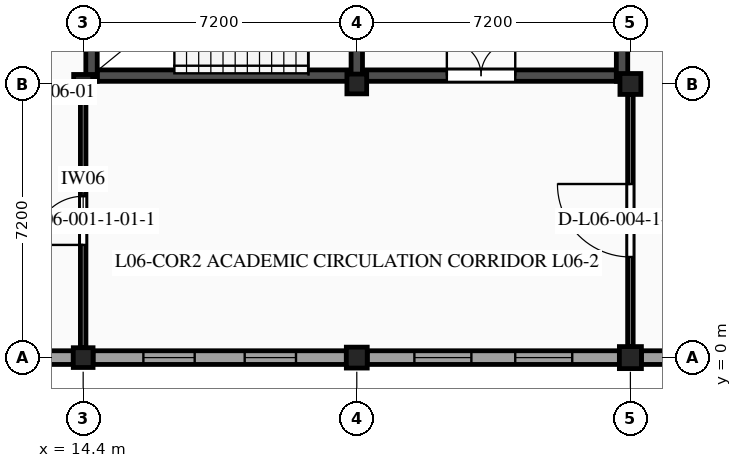
"""IFC4 building model, lengths in metres.
Left out: names, types, materials, properties, quantities, classifications, styles, units other than length and angle.
Written with IfcOpenShell. Run it as: python <this file> out.ifc"""

import sys

from ifc_helpers import new_model, si_unit, direction, frame, frame_2d, origin, origin_2d, place, context, subcontext, project, spatial, rectangle, extrude, element, fill, save


model = new_model("IFC4")
c1 = context("Model", 3, precision=1e-05, world=origin(), true_north=direction((0.0, 1.0)))
c2 = subcontext(c1, "Body", "Model", "MODEL_VIEW")
j1 = project(units=[si_unit("LENGTHUNIT", "METRE"), si_unit("PLANEANGLEUNIT", "RADIAN")], contexts=[c1])
p1 = place(None, origin())
s1 = spatial("IfcSite", under=j1, at=p1, CompositionType="ELEMENT")
p2 = place(p1, origin())
s2 = spatial("IfcBuilding", under=s1, at=p2, CompositionType="ELEMENT")
p3 = place(p2, frame((0.0, 0.0, 26.7)))
s3 = spatial("IfcBuildingStorey", under=s2, at=p3, CompositionType="ELEMENT", Elevation=26.7)
p4 = place(p3, frame((14.4, 0.0, 0.0), z_axis=(0.0, 0.0, 1.0), x_axis=(1.0, 0.0, 0.0)))
e1 = element("IfcColumn", 1, at=p4, inside=s3, PredefinedType="COLUMN", context=c2, shape_type="SweptSolid", body=[
    extrude(rectangle(XDim=0.52, YDim=0.52, at=origin_2d()), origin(), (0.0, 0.0, 1.0), 3.9),
])
p5 = place(p3, frame((14.4, 7.2, 0.0), z_axis=(0.0, 0.0, 1.0), x_axis=(1.0, 0.0, 0.0)))
e2 = element("IfcColumn", 2, at=p5, inside=s3, PredefinedType="COLUMN", context=c2, shape_type="SweptSolid", body=[
    extrude(rectangle(XDim=0.5, YDim=0.5, at=origin_2d()), origin(), (0.0, 0.0, 1.0), 3.9),
])
p6 = place(p3, frame((21.6, 0.0, 0.0), z_axis=(0.0, 0.0, 1.0), x_axis=(1.0, 0.0, 0.0)))
e3 = element("IfcColumn", 3, at=p6, inside=s3, PredefinedType="COLUMN", context=c2, shape_type="SweptSolid", body=[
    extrude(rectangle(XDim=0.55, YDim=0.55, at=origin_2d()), origin(), (0.0, 0.0, 1.0), 3.9),
])
p7 = place(p3, frame((21.6, 7.2, 0.0), z_axis=(0.0, 0.0, 1.0), x_axis=(1.0, 0.0, 0.0)))
e4 = element("IfcColumn", 4, at=p7, inside=s3, PredefinedType="COLUMN", context=c2, shape_type="SweptSolid", body=[
    extrude(rectangle(XDim=0.52, YDim=0.52, at=origin_2d()), origin(), (0.0, 0.0, 1.0), 3.9),
])
p8 = place(p3, frame((28.8, 0.0, 0.0), z_axis=(0.0, 0.0, 1.0), x_axis=(1.0, 0.0, 0.0)))
e5 = element("IfcColumn", 5, at=p8, inside=s3, PredefinedType="COLUMN", context=c2, shape_type="SweptSolid", body=[
    extrude(rectangle(XDim=0.58, YDim=0.58, at=origin_2d()), origin(), (0.0, 0.0, 1.0), 3.9),
])
p9 = place(p3, frame((28.8, 7.2, 0.0), z_axis=(0.0, 0.0, 1.0), x_axis=(1.0, 0.0, 0.0)))
e6 = element("IfcColumn", 6, at=p9, inside=s3, PredefinedType="COLUMN", context=c2, shape_type="SweptSolid", body=[
    extrude(rectangle(XDim=0.55, YDim=0.55, at=origin_2d()), origin(), (0.0, 0.0, 1.0), 3.9),
])
p10 = place(p3, frame((35.75, 0.0, 0.0), z_axis=(0.0, 0.0, 1.0), x_axis=(-1.0, 0.0, 0.0)))
e7 = element("IfcWall", 7, at=p10, inside=s3, PredefinedType="STANDARD", context=c2, shape_type="SweptSolid", body=[
    extrude(rectangle(XDim=6.66, YDim=0.36, at=frame_2d((3.33, 0.0))), origin(), (0.0, 0.0, 1.0), 2.83),
])
p11 = place(p10, frame((1.548, 0.0, 1.15)))
e8 = element("IfcOpeningElement", 8, at=p11, cuts=e7, PredefinedType="OPENING", context=c2, shape_type="SweptSolid", body=[
    extrude(rectangle(XDim=0.9, YDim=1.3, at=frame_2d((0.45, 0.65))), frame((0.0, 0.19, 0.0), z_axis=(0.0, -1.0, 0.0), x_axis=(1.0, 0.0, 0.0)), (0.0, 0.0, 1.0), 0.38),
])
p12 = place(p10, frame((4.212, 0.0, 1.15)))
e9 = element("IfcOpeningElement", 9, at=p12, cuts=e7, PredefinedType="OPENING", context=c2, shape_type="SweptSolid", body=[
    extrude(rectangle(XDim=0.9, YDim=1.3, at=frame_2d((0.45, 0.65))), frame((0.0, 0.19, 0.0), z_axis=(0.0, -1.0, 0.0), x_axis=(1.0, 0.0, 0.0)), (0.0, 0.0, 1.0), 0.38),
])
p13 = place(p3, frame((28.51, 0.0, 0.0), z_axis=(0.0, 0.0, 1.0), x_axis=(-1.0, 0.0, 0.0)))
e10 = element("IfcWall", 10, at=p13, inside=s3, PredefinedType="STANDARD", context=c2, shape_type="SweptSolid", body=[
    extrude(rectangle(XDim=6.635, YDim=0.36, at=frame_2d((3.317, 0.0))), origin(), (0.0, 0.0, 1.0), 2.865),
])
p14 = place(p13, frame((1.24, 0.0, 1.15)))
e11 = element("IfcOpeningElement", 11, at=p14, cuts=e10, PredefinedType="OPENING", context=c2, shape_type="SweptSolid", body=[
    extrude(rectangle(XDim=1.5, YDim=1.2, at=frame_2d((0.75, 0.6))), frame((0.0, 0.19, 0.0), z_axis=(0.0, -1.0, 0.0), x_axis=(1.0, 0.0, 0.0)), (0.0, 0.0, 1.0), 0.38),
])
p15 = place(p13, frame((3.895, 0.0, 1.15)))
e12 = element("IfcOpeningElement", 12, at=p15, cuts=e10, PredefinedType="OPENING", context=c2, shape_type="SweptSolid", body=[
    extrude(rectangle(XDim=1.5, YDim=1.2, at=frame_2d((0.75, 0.6))), frame((0.0, 0.19, 0.0), z_axis=(0.0, -1.0, 0.0), x_axis=(1.0, 0.0, 0.0)), (0.0, 0.0, 1.0), 0.38),
])
p16 = place(p3, frame((21.325, 0.0, 0.0), z_axis=(0.0, 0.0, 1.0), x_axis=(-1.0, 0.0, 0.0)))
e13 = element("IfcWall", 13, at=p16, inside=s3, PredefinedType="STANDARD", context=c2, shape_type="SweptSolid", body=[
    extrude(rectangle(XDim=6.665, YDim=0.36, at=frame_2d((3.333, 0.0))), origin(), (0.0, 0.0, 1.0), 2.865),
])
p17 = place(p16, frame((1.324, 0.0, 1.15)))
e14 = element("IfcOpeningElement", 14, at=p17, cuts=e13, PredefinedType="OPENING", context=c2, shape_type="SweptSolid", body=[
    extrude(rectangle(XDim=1.35, YDim=1.1, at=frame_2d((0.675, 0.55))), frame((0.0, 0.19, 0.0), z_axis=(0.0, -1.0, 0.0), x_axis=(1.0, 0.0, 0.0)), (0.0, 0.0, 1.0), 0.38),
])
p18 = place(p16, frame((3.99, 0.0, 1.15)))
e15 = element("IfcOpeningElement", 15, at=p18, cuts=e13, PredefinedType="OPENING", context=c2, shape_type="SweptSolid", body=[
    extrude(rectangle(XDim=1.35, YDim=1.1, at=frame_2d((0.675, 0.55))), frame((0.0, 0.19, 0.0), z_axis=(0.0, -1.0, 0.0), x_axis=(1.0, 0.0, 0.0)), (0.0, 0.0, 1.0), 0.38),
])
p19 = place(p3, frame((14.14, 0.0, 0.0), z_axis=(0.0, 0.0, 1.0), x_axis=(-1.0, 0.0, 0.0)))
e16 = element("IfcWall", 16, at=p19, inside=s3, PredefinedType="STANDARD", context=c2, shape_type="SweptSolid", body=[
    extrude(rectangle(XDim=6.69, YDim=0.36, at=frame_2d((3.345, 0.0))), origin(), (0.0, 0.0, 1.0), 2.865),
])
p20 = place(p19, frame((1.607, 0.0, 1.15)))
e17 = element("IfcOpeningElement", 17, at=p20, cuts=e16, PredefinedType="OPENING", context=c2, shape_type="SweptSolid", body=[
    extrude(rectangle(XDim=0.8, YDim=1.5, at=frame_2d((0.4, 0.75))), frame((0.0, 0.19, 0.0), z_axis=(0.0, -1.0, 0.0), x_axis=(1.0, 0.0, 0.0)), (0.0, 0.0, 1.0), 0.38),
])
p21 = place(p19, frame((4.283, 0.0, 1.15)))
e18 = element("IfcOpeningElement", 18, at=p21, cuts=e16, PredefinedType="OPENING", context=c2, shape_type="SweptSolid", body=[
    extrude(rectangle(XDim=0.8, YDim=1.5, at=frame_2d((0.4, 0.75))), frame((0.0, 0.19, 0.0), z_axis=(0.0, -1.0, 0.0), x_axis=(1.0, 0.0, 0.0)), (0.0, 0.0, 1.0), 0.38),
])
p22 = place(p3, frame((14.77, 7.42, 0.0), z_axis=(0.0, 0.0, 1.0), x_axis=(1.0, 0.0, 0.0)))
e19 = element("IfcWall", 19, at=p22, inside=s3, PredefinedType="SHEAR", context=c2, shape_type="SweptSolid", body=[
    extrude(rectangle(XDim=6.68, YDim=0.3, at=frame_2d((3.34, 0.0))), origin(), (0.0, 0.0, 1.0), 3.67),
])
p23 = place(p3, frame((14.62, 14.33, 0.0), z_axis=(0.0, 0.0, 1.0), x_axis=(0.0, -1.0, 0.0)))
e20 = element("IfcWall", 20, at=p23, inside=s3, PredefinedType="SHEAR", context=c2, shape_type="SweptSolid", body=[
    extrude(rectangle(XDim=7.06, YDim=0.3, at=frame_2d((3.53, 0.0))), origin(), (0.0, 0.0, 1.0), 3.67),
])
p24 = place(p3, frame((21.6, 7.27, 0.0), z_axis=(0.0, 0.0, 1.0), x_axis=(0.0, 1.0, 0.0)))
e21 = element("IfcWall", 21, at=p24, inside=s3, PredefinedType="SHEAR", context=c2, shape_type="SweptSolid", body=[
    extrude(rectangle(XDim=7.06, YDim=0.3, at=frame_2d((3.53, 0.0))), origin(), (0.0, 0.0, 1.0), 3.67),
])
p25 = place(p24, frame((1.4, 0.0, 0.0)))
e22 = element("IfcOpeningElement", 22, at=p25, cuts=e21, PredefinedType="OPENING", context=c2, shape_type="SweptSolid", body=[
    extrude(rectangle(XDim=1.8, YDim=2.2, at=frame_2d((0.9, 1.1))), frame((0.0, 0.16, 0.0), z_axis=(0.0, -1.0, 0.0), x_axis=(1.0, 0.0, 0.0)), (0.0, 0.0, 1.0), 0.32),
])
p26 = place(p3, frame((21.75, 7.42, 0.0), z_axis=(0.0, 0.0, 1.0), x_axis=(1.0, 0.0, 0.0)))
e23 = element("IfcWall", 23, at=p26, inside=s3, PredefinedType="SHEAR", context=c2, shape_type="SweptSolid", body=[
    extrude(rectangle(XDim=6.68, YDim=0.3, at=frame_2d((3.34, 0.0))), origin(), (0.0, 0.0, 1.0), 3.67),
])
p27 = place(p26, frame((2.22, 0.0, 0.0)))
e24 = element("IfcOpeningElement", 24, at=p27, cuts=e23, PredefinedType="OPENING", context=c2, shape_type="SweptSolid", body=[
    extrude(rectangle(XDim=1.8, YDim=2.2, at=frame_2d((0.9, 1.1))), frame((0.0, 0.16, 0.0), z_axis=(0.0, -1.0, 0.0), x_axis=(1.0, 0.0, 0.0)), (0.0, 0.0, 1.0), 0.32),
])
p28 = place(p3, frame((28.58, 7.27, 0.0), z_axis=(0.0, 0.0, 1.0), x_axis=(0.0, 1.0, 0.0)))
e25 = element("IfcWall", 25, at=p28, inside=s3, PredefinedType="SHEAR", context=c2, shape_type="SweptSolid", body=[
    extrude(rectangle(XDim=7.06, YDim=0.3, at=frame_2d((3.53, 0.0))), origin(), (0.0, 0.0, 1.0), 3.67),
])
p29 = place(p3, frame((14.4, 0.265, 0.0), z_axis=(0.0, 0.0, 1.0), x_axis=(0.0, 1.0, 0.0)))
e26 = element("IfcWall", 26, at=p29, inside=s3, PredefinedType="PARTITIONING", context=c2, shape_type="SweptSolid", body=[
    extrude(rectangle(XDim=6.68, YDim=0.145, at=frame_2d((3.34, 0.0))), origin(), (0.0, 0.0, 1.0), 3.04),
])
p30 = place(p29, frame((2.7, 0.0, 0.0)))
e27 = element("IfcOpeningElement", 27, at=p30, cuts=e26, PredefinedType="OPENING", context=c2, shape_type="SweptSolid", body=[
    extrude(rectangle(XDim=1.28, YDim=2.24, at=frame_2d((0.64, 1.12))), frame((0.0, 0.083, 0.0), z_axis=(0.0, -1.0, 0.0), x_axis=(1.0, 0.0, 0.0)), (0.0, 0.0, 1.0), 0.165),
])
p31 = place(p3, frame((28.8, 0.295, 0.0), z_axis=(0.0, 0.0, 1.0), x_axis=(0.0, 1.0, 0.0)))
e28 = element("IfcWall", 28, at=p31, inside=s3, PredefinedType="PARTITIONING", context=c2, shape_type="SweptSolid", body=[
    extrude(rectangle(XDim=6.625, YDim=0.145, at=frame_2d((3.312, 0.0))), origin(), (0.0, 0.0, 1.0), 3.005),
])
p32 = place(p31, frame((2.353, 0.0, 0.0)))
e29 = element("IfcOpeningElement", 29, at=p32, cuts=e28, PredefinedType="OPENING", context=c2, shape_type="SweptSolid", body=[
    extrude(rectangle(XDim=1.92, YDim=2.35, at=frame_2d((0.96, 1.175))), frame((0.0, 0.083, 0.0), z_axis=(0.0, -1.0, 0.0), x_axis=(1.0, 0.0, 0.0)), (0.0, 0.0, 1.0), 0.165),
])
p33 = place(p14, origin())
e30 = element("IfcWindow", 30, at=p33, inside=s3, PartitioningType="SINGLE_PANEL", PredefinedType="WINDOW", context=c2, shape_type="SweptSolid", body=[
    extrude(rectangle(XDim=1.5, YDim=1.2, at=frame_2d((0.75, 0.6))), frame((0.0, -0.08, 0.0), z_axis=(0.0, -1.0, 0.0), x_axis=(1.0, 0.0, 0.0)), (0.0, 0.0, 1.0), 0.06),
])
fill(e11, e30)
p34 = place(p15, origin())
e31 = element("IfcWindow", 31, at=p34, inside=s3, PartitioningType="SINGLE_PANEL", PredefinedType="WINDOW", context=c2, shape_type="SweptSolid", body=[
    extrude(rectangle(XDim=1.5, YDim=1.2, at=frame_2d((0.75, 0.6))), frame((0.0, -0.08, 0.0), z_axis=(0.0, -1.0, 0.0), x_axis=(1.0, 0.0, 0.0)), (0.0, 0.0, 1.0), 0.06),
])
fill(e12, e31)
p35 = place(p17, origin())
e32 = element("IfcWindow", 32, at=p35, inside=s3, PartitioningType="SINGLE_PANEL", PredefinedType="WINDOW", context=c2, shape_type="SweptSolid", body=[
    extrude(rectangle(XDim=1.35, YDim=1.1, at=frame_2d((0.675, 0.55))), frame((0.0, -0.08, 0.0), z_axis=(0.0, -1.0, 0.0), x_axis=(1.0, 0.0, 0.0)), (0.0, 0.0, 1.0), 0.06),
])
fill(e14, e32)
p36 = place(p18, origin())
e33 = element("IfcWindow", 33, at=p36, inside=s3, PartitioningType="SINGLE_PANEL", PredefinedType="WINDOW", context=c2, shape_type="SweptSolid", body=[
    extrude(rectangle(XDim=1.35, YDim=1.1, at=frame_2d((0.675, 0.55))), frame((0.0, -0.08, 0.0), z_axis=(0.0, -1.0, 0.0), x_axis=(1.0, 0.0, 0.0)), (0.0, 0.0, 1.0), 0.06),
])
fill(e15, e33)
p37 = place(p27, origin())
e34 = element("IfcDoor", 34, at=p37, inside=s3, OperationType="DOUBLE_DOOR_SINGLE_SWING", PredefinedType="DOOR", context=c2, shape_type="SweptSolid", body=[
    extrude(rectangle(XDim=1.8, YDim=2.2, at=frame_2d((0.9, 1.1))), frame((0.0, 0.025, 0.0), z_axis=(0.0, -1.0, 0.0), x_axis=(1.0, 0.0, 0.0)), (0.0, 0.0, 1.0), 0.05),
])
fill(e24, e34)
p38 = place(p30, origin())
e35 = element("IfcDoor", 35, at=p38, inside=s3, OperationType="SINGLE_SWING_LEFT", PredefinedType="DOOR", context=c2, shape_type="SweptSolid", body=[
    extrude(rectangle(XDim=1.28, YDim=2.24, at=frame_2d((0.64, 1.12))), frame((0.0, 0.025, 0.0), z_axis=(0.0, -1.0, 0.0), x_axis=(1.0, 0.0, 0.0)), (0.0, 0.0, 1.0), 0.05),
])
fill(e27, e35)
p39 = place(p32, origin())
e36 = element("IfcDoor", 36, at=p39, inside=s3, OperationType="SINGLE_SWING_RIGHT", PredefinedType="DOOR", context=c2, shape_type="SweptSolid", body=[
    extrude(rectangle(XDim=1.92, YDim=2.35, at=frame_2d((0.96, 1.175))), frame((0.0, 0.025, 0.0), z_axis=(0.0, -1.0, 0.0), x_axis=(1.0, 0.0, 0.0)), (0.0, 0.0, 1.0), 0.05),
])
fill(e29, e36)
save(model, sys.argv[1])
